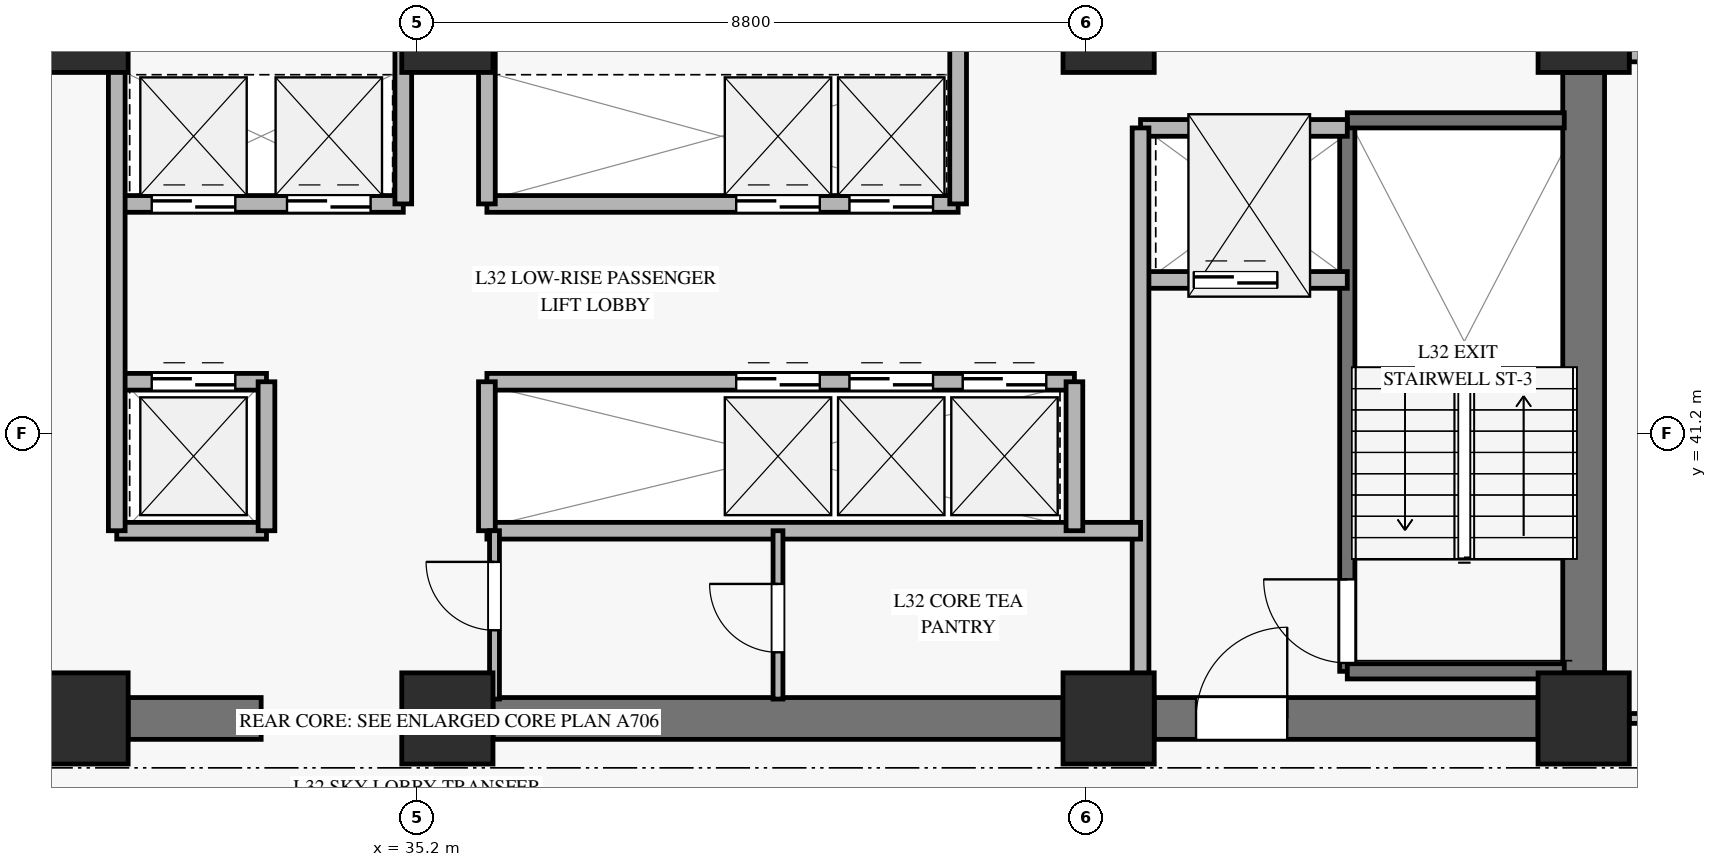
"""IFC4 building model, lengths in metres.
Left out: names, types, materials, properties, quantities, classifications, styles, units other than length and angle.
Written with IfcOpenShell. Run it as: python <this file> out.ifc"""

import sys

from ifc_helpers import new_model, si_unit, direction, frame, frame_2d, origin, origin_2d, place, context, subcontext, project, spatial, rectangle, extrude, source, transform, mapped, element, fill, save


model = new_model("IFC4")
c1 = context("Model", 3, precision=1e-05, world=origin(), true_north=direction((0.0, 1.0)))
c2 = subcontext(c1, "Body", "Model", "MODEL_VIEW")
j1 = project(units=[si_unit("LENGTHUNIT", "METRE"), si_unit("PLANEANGLEUNIT", "RADIAN")], contexts=[c1])
p1 = place(None, origin())
s1 = spatial("IfcSite", under=j1, at=p1, CompositionType="ELEMENT")
p2 = place(p1, origin())
s2 = spatial("IfcBuilding", under=s1, at=p2, CompositionType="ELEMENT")
p3 = place(p2, frame((0.0, 0.0, 130.9)))
s3 = spatial("IfcBuildingStorey", under=s2, at=p3, CompositionType="ELEMENT", Elevation=130.9)
m1 = source(origin(), c2, "Body", "SweptSolid", [
    extrude(rectangle(XDim=1.2, YDim=1.2, at=origin_2d()), origin(), (0.0, 0.0, 1.0), 6.57),
])
for number, where, z_axis, x_axis in (
    (1, (30.8, 37.45, 0.0), (0.0, 0.0, 1.0), (1.0, 0.0, 0.0)),
    (2, (30.8, 46.55, 0.0), (0.0, 0.0, 1.0), (1.0, 0.0, 0.0)),
    (3, (35.6, 37.45, 0.0), (0.0, 0.0, 1.0), (1.0, 0.0, 0.0)),
    (4, (35.6, 46.55, 0.0), (0.0, 0.0, 1.0), (1.0, 0.0, 0.0)),
    (5, (44.3, 37.45, 0.0), (0.0, 0.0, 1.0), (1.0, 0.0, 0.0)),
    (6, (44.3, 46.55, 0.0), (0.0, 0.0, 1.0), (1.0, 0.0, 0.0)),
    (7, (50.55, 37.45, 0.0), (0.0, 0.0, 1.0), (1.0, 0.0, 0.0)),
    (8, (50.55, 46.55, 0.0), (0.0, 0.0, 1.0), (1.0, 0.0, 0.0)),
):
    element("IfcColumn", number, at=place(p3, frame(where, z_axis=z_axis, x_axis=x_axis)), inside=s3, PredefinedType="PILASTER", context=c2, shape_type="MappedRepresentation", body=[
        mapped(m1, transform((0.0, 0.0, 0.0), x_axis=(1.0, 0.0, 0.0), y_axis=(0.0, 1.0, 0.0), z_axis=(0.0, 0.0, 1.0), scale=1.0)),
    ])
p4 = place(p3, frame((31.4, 37.45, 0.0), z_axis=(0.0, 0.0, 1.0), x_axis=(1.0, 0.0, 0.0)))
e9 = element("IfcWall", 9, at=p4, inside=s3, PredefinedType="SHEAR", context=c2, shape_type="SweptSolid", body=[
    extrude(rectangle(XDim=1.75, YDim=0.55, at=frame_2d((0.875, 0.0))), origin(), (0.0, 0.0, 1.0), 6.57),
])
p5 = place(p3, frame((36.2, 37.45, 0.0), z_axis=(0.0, 0.0, 1.0), x_axis=(1.0, 0.0, 0.0)))
e10 = element("IfcWall", 10, at=p5, inside=s3, PredefinedType="SHEAR", context=c2, shape_type="SweptSolid", body=[
    extrude(rectangle(XDim=7.5, YDim=0.55, at=frame_2d((3.75, 0.0))), origin(), (0.0, 0.0, 1.0), 6.57),
])
p6 = place(p3, frame((44.9, 37.45, 0.0), z_axis=(0.0, 0.0, 1.0), x_axis=(1.0, 0.0, 0.0)))
e11 = element("IfcWall", 11, at=p6, inside=s3, PredefinedType="SHEAR", context=c2, shape_type="SweptSolid", body=[
    extrude(rectangle(XDim=5.05, YDim=0.55, at=frame_2d((2.525, 0.0))), origin(), (0.0, 0.0, 1.0), 6.57),
])
p7 = place(p6, frame((0.55, 0.0, 0.0)))
e12 = element("IfcOpeningElement", 12, at=p7, cuts=e11, PredefinedType="OPENING", context=c2, shape_type="SweptSolid", body=[
    extrude(rectangle(XDim=1.2, YDim=2.15, at=frame_2d((0.6, 1.075))), frame((0.0, 0.285, 0.0), z_axis=(0.0, -1.0, 0.0), x_axis=(1.0, 0.0, 0.0)), (0.0, 0.0, 1.0), 0.57),
])
p8 = place(p3, frame((50.55, 38.05, 0.0), z_axis=(0.0, 0.0, 1.0), x_axis=(0.0, 1.0, 0.0)))
e13 = element("IfcWall", 13, at=p8, inside=s3, PredefinedType="SHEAR", context=c2, shape_type="SweptSolid", body=[
    extrude(rectangle(XDim=7.9, YDim=0.55, at=frame_2d((3.95, 0.0))), origin(), (0.0, 0.0, 1.0), 6.57),
])
p9 = place(p3, frame((51.15, 46.25, 0.0), z_axis=(0.0, 0.0, 1.0), x_axis=(1.0, 0.0, 0.0)))
e14 = element("IfcWall", 14, at=p9, inside=s3, PredefinedType="SOLIDWALL", context=c2, shape_type="SweptSolid", body=[
    extrude(rectangle(XDim=10.83, YDim=0.32, at=frame_2d((5.415, 0.0))), origin(), (0.0, 0.0, 1.0), 6.05),
])
p10 = place(p9, frame((4.615, 0.0, 0.45)))
e15 = element("IfcOpeningElement", 15, at=p10, cuts=e14, PredefinedType="OPENING", context=c2, shape_type="SweptSolid", body=[
    extrude(rectangle(XDim=1.6, YDim=2.0, at=frame_2d((0.8, 1.0))), frame((0.0, 0.17, 0.0), z_axis=(0.0, -1.0, 0.0), x_axis=(1.0, 0.0, 0.0)), (0.0, 0.0, 1.0), 0.34),
])
p11 = place(p3, frame((47.44, 38.07, 0.0), z_axis=(0.0, 0.0, 1.0), x_axis=(0.0, 1.0, 0.0)))
e16 = element("IfcWall", 16, at=p11, inside=s3, PredefinedType="SOLIDWALL", context=c2, shape_type="SweptSolid", body=[
    extrude(rectangle(XDim=7.25, YDim=0.2, at=frame_2d((3.625, 0.0))), origin(), (0.0, 0.0, 1.0), 6.8),
])
p12 = place(p11, frame((0.11, 0.0, 0.0)))
e17 = element("IfcOpeningElement", 17, at=p12, cuts=e16, PredefinedType="OPENING", context=c2, shape_type="SweptSolid", body=[
    extrude(rectangle(XDim=1.1, YDim=2.15, at=frame_2d((0.55, 1.075))), frame((0.0, 0.11, 0.0), z_axis=(0.0, -1.0, 0.0), x_axis=(1.0, 0.0, 0.0)), (0.0, 0.0, 1.0), 0.22),
])
for number, where, z_axis, x_axis in (
    (18, (47.44, 45.32, 0.0), (0.0, 0.0, 1.0), (1.0, 0.0, 0.0)),
    (19, (47.44, 38.07, 0.0), (0.0, 0.0, 1.0), (1.0, 0.0, 0.0)),
):
    element("IfcWall", number, at=place(p3, frame(where, z_axis=z_axis, x_axis=x_axis)), inside=s3, PredefinedType="SOLIDWALL", context=c2, shape_type="SweptSolid", body=[
        extrude(rectangle(XDim=2.855, YDim=0.2, at=frame_2d((1.427, 0.0))), origin(), (0.0, 0.0, 1.0), 6.8),
    ])
p13 = place(p3, frame((44.72, 43.22, 0.0), z_axis=(0.0, 0.0, 1.0), x_axis=(1.0, 0.0, 0.0)))
e20 = element("IfcWall", 20, at=p13, inside=s3, PredefinedType="SOLIDWALL", context=c2, shape_type="SweptSolid", body=[
    extrude(rectangle(XDim=2.72, YDim=0.22, at=frame_2d((1.36, 0.0))), origin(), (0.0, 0.0, 1.0), 6.57),
])
p14 = place(p13, frame((0.7, 0.0, 0.0)))
e21 = element("IfcOpeningElement", 21, at=p14, cuts=e20, PredefinedType="OPENING", context=c2, shape_type="SweptSolid", body=[
    extrude(rectangle(XDim=1.1, YDim=2.2, at=frame_2d((0.55, 1.1))), frame((0.0, 0.12, 0.0), z_axis=(0.0, -1.0, 0.0), x_axis=(1.0, 0.0, 0.0)), (0.0, 0.0, 1.0), 0.24),
])
p15 = place(p3, frame((44.72, 45.22, 0.0), z_axis=(0.0, 0.0, 1.0), x_axis=(1.0, 0.0, 0.0)))
e22 = element("IfcWall", 22, at=p15, inside=s3, PredefinedType="SOLIDWALL", context=c2, shape_type="SweptSolid", body=[
    extrude(rectangle(XDim=2.72, YDim=0.22, at=frame_2d((1.36, 0.0))), origin(), (0.0, 0.0, 1.0), 6.57),
])
p16 = place(p3, frame((44.72, 37.705, 0.0), z_axis=(0.0, 0.0, 1.0), x_axis=(0.0, 1.0, 0.0)))
e23 = element("IfcWall", 23, at=p16, inside=s3, PredefinedType="SOLIDWALL", context=c2, shape_type="SweptSolid", body=[
    extrude(rectangle(XDim=7.515, YDim=0.22, at=frame_2d((3.757, 0.0))), origin(), (0.0, 0.0, 1.0), 6.57),
])
p17 = place(p3, frame((31.25, 44.22, 0.0), z_axis=(0.0, 0.0, 1.0), x_axis=(1.0, 0.0, 0.0)))
e24 = element("IfcWall", 24, at=p17, inside=s3, PredefinedType="SOLIDWALL", context=c2, shape_type="SweptSolid", body=[
    extrude(rectangle(XDim=3.77, YDim=0.22, at=frame_2d((1.885, 0.0))), origin(), (0.0, 0.0, 1.0), 6.57),
])
p18 = place(p17, frame((0.46, 0.0, 0.0)))
e25 = element("IfcOpeningElement", 25, at=p18, cuts=e24, PredefinedType="OPENING", context=c2, shape_type="SweptSolid", body=[
    extrude(rectangle(XDim=1.1, YDim=2.2, at=frame_2d((0.55, 1.1))), frame((0.0, 0.12, 0.0), z_axis=(0.0, -1.0, 0.0), x_axis=(1.0, 0.0, 0.0)), (0.0, 0.0, 1.0), 0.24),
])
p19 = place(p17, frame((2.24, 0.0, 0.0)))
e26 = element("IfcOpeningElement", 26, at=p19, cuts=e24, PredefinedType="OPENING", context=c2, shape_type="SweptSolid", body=[
    extrude(rectangle(XDim=1.1, YDim=2.2, at=frame_2d((0.55, 1.1))), frame((0.0, 0.12, 0.0), z_axis=(0.0, -1.0, 0.0), x_axis=(1.0, 0.0, 0.0)), (0.0, 0.0, 1.0), 0.24),
])
p20 = place(p3, frame((36.12, 44.22, 0.0), z_axis=(0.0, 0.0, 1.0), x_axis=(1.0, 0.0, 0.0)))
e27 = element("IfcWall", 27, at=p20, inside=s3, PredefinedType="SOLIDWALL", context=c2, shape_type="SweptSolid", body=[
    extrude(rectangle(XDim=6.2, YDim=0.22, at=frame_2d((3.1, 0.0))), origin(), (0.0, 0.0, 1.0), 6.57),
])
p21 = place(p20, frame((3.28, 0.0, 0.0)))
e28 = element("IfcOpeningElement", 28, at=p21, cuts=e27, PredefinedType="OPENING", context=c2, shape_type="SweptSolid", body=[
    extrude(rectangle(XDim=1.1, YDim=2.2, at=frame_2d((0.55, 1.1))), frame((0.0, 0.12, 0.0), z_axis=(0.0, -1.0, 0.0), x_axis=(1.0, 0.0, 0.0)), (0.0, 0.0, 1.0), 0.24),
])
p22 = place(p20, frame((4.77, 0.0, 0.0)))
e29 = element("IfcOpeningElement", 29, at=p22, cuts=e27, PredefinedType="OPENING", context=c2, shape_type="SweptSolid", body=[
    extrude(rectangle(XDim=1.1, YDim=2.2, at=frame_2d((0.55, 1.1))), frame((0.0, 0.12, 0.0), z_axis=(0.0, -1.0, 0.0), x_axis=(1.0, 0.0, 0.0)), (0.0, 0.0, 1.0), 0.24),
])
for number, where, z_axis, x_axis in (
    (30, (35.02, 44.22, 0.0), (0.0, 0.0, 1.0), (0.0, 1.0, 0.0)),
    (31, (36.12, 44.22, 0.0), (0.0, 0.0, 1.0), (0.0, 1.0, 0.0)),
    (32, (42.32, 44.22, 0.0), (0.0, 0.0, 1.0), (0.0, 1.0, 0.0)),
):
    element("IfcWall", number, at=place(p3, frame(where, z_axis=z_axis, x_axis=x_axis)), inside=s3, PredefinedType="SOLIDWALL", context=c2, shape_type="SweptSolid", body=[
        extrude(rectangle(XDim=2.075, YDim=0.22, at=frame_2d((1.038, 0.0))), origin(), (0.0, 0.0, 1.0), 6.57),
    ])
p23 = place(p3, frame((31.25, 41.88, 0.0), z_axis=(0.0, 0.0, 1.0), x_axis=(1.0, 0.0, 0.0)))
e33 = element("IfcWall", 33, at=p23, inside=s3, PredefinedType="SOLIDWALL", context=c2, shape_type="SweptSolid", body=[
    extrude(rectangle(XDim=1.97, YDim=0.22, at=frame_2d((0.985, 0.0))), origin(), (0.0, 0.0, 1.0), 6.57),
])
p24 = place(p23, frame((0.46, 0.0, 0.0)))
e34 = element("IfcOpeningElement", 34, at=p24, cuts=e33, PredefinedType="OPENING", context=c2, shape_type="SweptSolid", body=[
    extrude(rectangle(XDim=1.1, YDim=2.2, at=frame_2d((0.55, 1.1))), frame((0.0, 0.12, 0.0), z_axis=(0.0, -1.0, 0.0), x_axis=(1.0, 0.0, 0.0)), (0.0, 0.0, 1.0), 0.24),
])
p25 = place(p3, frame((36.12, 41.88, 0.0), z_axis=(0.0, 0.0, 1.0), x_axis=(1.0, 0.0, 0.0)))
e35 = element("IfcWall", 35, at=p25, inside=s3, PredefinedType="SOLIDWALL", context=c2, shape_type="SweptSolid", body=[
    extrude(rectangle(XDim=7.73, YDim=0.22, at=frame_2d((3.865, 0.0))), origin(), (0.0, 0.0, 1.0), 6.57),
])
p26 = place(p25, frame((6.26, 0.0, 0.0)))
e36 = element("IfcOpeningElement", 36, at=p26, cuts=e35, PredefinedType="OPENING", context=c2, shape_type="SweptSolid", body=[
    extrude(rectangle(XDim=1.1, YDim=2.2, at=frame_2d((0.55, 1.1))), frame((0.0, 0.12, 0.0), z_axis=(0.0, -1.0, 0.0), x_axis=(1.0, 0.0, 0.0)), (0.0, 0.0, 1.0), 0.24),
])
p27 = place(p25, frame((3.28, 0.0, 0.0)))
e37 = element("IfcOpeningElement", 37, at=p27, cuts=e35, PredefinedType="OPENING", context=c2, shape_type="SweptSolid", body=[
    extrude(rectangle(XDim=1.1, YDim=2.2, at=frame_2d((0.55, 1.1))), frame((0.0, 0.12, 0.0), z_axis=(0.0, -1.0, 0.0), x_axis=(1.0, 0.0, 0.0)), (0.0, 0.0, 1.0), 0.24),
])
p28 = place(p25, frame((4.77, 0.0, 0.0)))
e38 = element("IfcOpeningElement", 38, at=p28, cuts=e35, PredefinedType="OPENING", context=c2, shape_type="SweptSolid", body=[
    extrude(rectangle(XDim=1.1, YDim=2.2, at=frame_2d((0.55, 1.1))), frame((0.0, 0.12, 0.0), z_axis=(0.0, -1.0, 0.0), x_axis=(1.0, 0.0, 0.0)), (0.0, 0.0, 1.0), 0.24),
])
p29 = place(p3, frame((31.25, 39.92, 0.0), z_axis=(0.0, 0.0, 1.0), x_axis=(1.0, 0.0, 0.0)))
e39 = element("IfcWall", 39, at=p29, inside=s3, PredefinedType="SOLIDWALL", context=c2, shape_type="SweptSolid", body=[
    extrude(rectangle(XDim=1.97, YDim=0.22, at=frame_2d((0.985, 0.0))), origin(), (0.0, 0.0, 1.0), 6.57),
])
p30 = place(p3, frame((33.22, 39.92, 0.0), z_axis=(0.0, 0.0, 1.0), x_axis=(0.0, 1.0, 0.0)))
e40 = element("IfcWall", 40, at=p30, inside=s3, PredefinedType="SOLIDWALL", context=c2, shape_type="SweptSolid", body=[
    extrude(rectangle(XDim=1.96, YDim=0.22, at=frame_2d((0.98, 0.0))), origin(), (0.0, 0.0, 1.0), 6.57),
])
p31 = place(p3, frame((36.12, 39.92, 0.0), z_axis=(0.0, 0.0, 1.0), x_axis=(1.0, 0.0, 0.0)))
e41 = element("IfcWall", 41, at=p31, inside=s3, PredefinedType="SOLIDWALL", context=c2, shape_type="SweptSolid", body=[
    extrude(rectangle(XDim=8.6, YDim=0.22, at=frame_2d((4.3, 0.0))), origin(), (0.0, 0.0, 1.0), 5.855),
])
p32 = place(p3, frame((36.12, 39.92, 0.0), z_axis=(0.0, 0.0, 1.0), x_axis=(0.0, 1.0, 0.0)))
e42 = element("IfcWall", 42, at=p32, inside=s3, PredefinedType="SOLIDWALL", context=c2, shape_type="SweptSolid", body=[
    extrude(rectangle(XDim=1.96, YDim=0.22, at=frame_2d((0.98, 0.0))), origin(), (0.0, 0.0, 1.0), 6.57),
])
p33 = place(p3, frame((31.25, 39.92, 0.0), z_axis=(0.0, 0.0, 1.0), x_axis=(0.0, 1.0, 0.0)))
e43 = element("IfcWall", 43, at=p33, inside=s3, PredefinedType="SOLIDWALL", context=c2, shape_type="SweptSolid", body=[
    extrude(rectangle(XDim=6.375, YDim=0.22, at=frame_2d((3.188, 0.0))), origin(), (0.0, 0.0, 1.0), 6.57),
])
p34 = place(p3, frame((43.85, 39.92, 0.0), z_axis=(0.0, 0.0, 1.0), x_axis=(0.0, 1.0, 0.0)))
e44 = element("IfcWall", 44, at=p34, inside=s3, PredefinedType="SOLIDWALL", context=c2, shape_type="SweptSolid", body=[
    extrude(rectangle(XDim=1.96, YDim=0.22, at=frame_2d((0.98, 0.0))), origin(), (0.0, 0.0, 1.0), 6.57),
])
p35 = place(p3, frame((36.22, 37.705, 0.0), z_axis=(0.0, 0.0, 1.0), x_axis=(0.0, 1.0, 0.0)))
e45 = element("IfcWall", 45, at=p35, inside=s3, PredefinedType="PARTITIONING", context=c2, shape_type="SweptSolid", body=[
    extrude(rectangle(XDim=2.215, YDim=0.13, at=frame_2d((1.107, 0.0))), origin(), (0.0, 0.0, 1.0), 6.57),
])
p36 = place(p35, frame((0.905, 0.0, 0.0)))
e46 = element("IfcOpeningElement", 46, at=p36, cuts=e45, PredefinedType="OPENING", context=c2, shape_type="SweptSolid", body=[
    extrude(rectangle(XDim=0.9, YDim=2.1, at=frame_2d((0.45, 1.05))), frame((0.0, 0.075, 0.0), z_axis=(0.0, -1.0, 0.0), x_axis=(1.0, 0.0, 0.0)), (0.0, 0.0, 1.0), 0.15),
])
p37 = place(p3, frame((39.95, 37.705, 0.0), z_axis=(0.0, 0.0, 1.0), x_axis=(0.0, 1.0, 0.0)))
e47 = element("IfcWall", 47, at=p37, inside=s3, PredefinedType="PARTITIONING", context=c2, shape_type="SweptSolid", body=[
    extrude(rectangle(XDim=2.215, YDim=0.13, at=frame_2d((1.107, 0.0))), origin(), (0.0, 0.0, 1.0), 6.57),
])
p38 = place(p37, frame((0.615, 0.0, 0.0)))
e48 = element("IfcOpeningElement", 48, at=p38, cuts=e47, PredefinedType="OPENING", context=c2, shape_type="SweptSolid", body=[
    extrude(rectangle(XDim=0.9, YDim=2.1, at=frame_2d((0.45, 1.05))), frame((0.0, 0.075, 0.0), z_axis=(0.0, -1.0, 0.0), x_axis=(1.0, 0.0, 0.0)), (0.0, 0.0, 1.0), 0.15),
])
p39 = place(p3, frame((51.15, 37.45, 0.0), z_axis=(0.0, 0.0, 1.0), x_axis=(1.0, 0.0, 0.0)))
e49 = element("IfcWall", 49, at=p39, inside=s3, PredefinedType="PARTITIONING", context=c2, shape_type="SweptSolid", body=[
    extrude(rectangle(XDim=14.271, YDim=0.13, at=frame_2d((7.135, 0.0))), origin(), (0.0, 0.0, 1.0), 6.055),
])
p40 = place(p39, frame((0.5, 0.0, 0.0)))
e50 = element("IfcOpeningElement", 50, at=p40, cuts=e49, PredefinedType="OPENING", context=c2, shape_type="SweptSolid", body=[
    extrude(rectangle(XDim=0.9, YDim=2.1, at=frame_2d((0.45, 1.05))), frame((0.0, 0.075, 0.0), z_axis=(0.0, -1.0, 0.0), x_axis=(1.0, 0.0, 0.0)), (0.0, 0.0, 1.0), 0.15),
])
p41 = place(p39, frame((10.265, 0.0, 0.0)))
e51 = element("IfcOpeningElement", 51, at=p41, cuts=e49, PredefinedType="OPENING", context=c2, shape_type="SweptSolid", body=[
    extrude(rectangle(XDim=0.95, YDim=2.1, at=frame_2d((0.475, 1.05))), frame((0.0, 0.075, 0.0), z_axis=(0.0, -1.0, 0.0), x_axis=(1.0, 0.0, 0.0)), (0.0, 0.0, 1.0), 0.15),
])
m2 = source(origin(), c2, "Body", "SweptSolid", [
    extrude(rectangle(XDim=1.1, YDim=2.15, at=frame_2d((0.55, 1.075))), frame((0.0, 0.025, 0.0), z_axis=(0.0, -1.0, 0.0), x_axis=(1.0, 0.0, 0.0)), (0.0, 0.0, 1.0), 0.05),
])
p42 = place(p12, origin())
e52 = element("IfcDoor", 52, at=p42, inside=s3, OperationType="SINGLE_SWING_RIGHT", PredefinedType="DOOR", context=c2, shape_type="MappedRepresentation", body=[
    mapped(m2, transform((0.0, 0.0, 0.0), x_axis=(1.0, 0.0, 0.0), y_axis=(0.0, 1.0, 0.0), z_axis=(0.0, 0.0, 1.0), scale=1.0)),
])
fill(e17, e52)
m3 = source(origin(), c2, "Body", "SweptSolid", [
    extrude(rectangle(XDim=1.1, YDim=2.2, at=frame_2d((0.55, 1.1))), frame((0.0, 0.025, 0.0), z_axis=(0.0, -1.0, 0.0), x_axis=(1.0, 0.0, 0.0)), (0.0, 0.0, 1.0), 0.05),
])
p43 = place(p14, origin())
e53 = element("IfcDoor", 53, at=p43, inside=s3, OperationType="SLIDING_TO_LEFT", PredefinedType="DOOR", context=c2, shape_type="MappedRepresentation", body=[
    mapped(m3, transform((0.0, 0.0, 0.0), x_axis=(1.0, 0.0, 0.0), y_axis=(0.0, 1.0, 0.0), z_axis=(0.0, 0.0, 1.0), scale=1.0)),
])
fill(e21, e53)
m4 = source(origin(), c2, "Body", "SweptSolid", [
    extrude(rectangle(XDim=1.2, YDim=2.15, at=frame_2d((0.6, 1.075))), frame((0.0, 0.025, 0.0), z_axis=(0.0, -1.0, 0.0), x_axis=(1.0, 0.0, 0.0)), (0.0, 0.0, 1.0), 0.05),
])
p44 = place(p7, origin())
e54 = element("IfcDoor", 54, at=p44, inside=s3, OperationType="SINGLE_SWING_RIGHT", PredefinedType="DOOR", context=c2, shape_type="MappedRepresentation", body=[
    mapped(m4, transform((0.0, 0.0, 0.0), x_axis=(1.0, 0.0, 0.0), y_axis=(0.0, 1.0, 0.0), z_axis=(0.0, 0.0, 1.0), scale=1.0)),
])
fill(e12, e54)
p45 = place(p18, origin())
e55 = element("IfcDoor", 55, at=p45, inside=s3, OperationType="SLIDING_TO_LEFT", PredefinedType="DOOR", context=c2, shape_type="MappedRepresentation", body=[
    mapped(m3, transform((0.0, 0.0, 0.0), x_axis=(1.0, 0.0, 0.0), y_axis=(0.0, 1.0, 0.0), z_axis=(0.0, 0.0, 1.0), scale=1.0)),
])
fill(e25, e55)
p46 = place(p19, origin())
e56 = element("IfcDoor", 56, at=p46, inside=s3, OperationType="SLIDING_TO_LEFT", PredefinedType="DOOR", context=c2, shape_type="MappedRepresentation", body=[
    mapped(m3, transform((0.0, 0.0, 0.0), x_axis=(1.0, 0.0, 0.0), y_axis=(0.0, 1.0, 0.0), z_axis=(0.0, 0.0, 1.0), scale=1.0)),
])
fill(e26, e56)
p47 = place(p24, origin())
e57 = element("IfcDoor", 57, at=p47, inside=s3, OperationType="SLIDING_TO_LEFT", PredefinedType="DOOR", context=c2, shape_type="MappedRepresentation", body=[
    mapped(m3, transform((0.0, 0.0, 0.0), x_axis=(1.0, 0.0, 0.0), y_axis=(0.0, 1.0, 0.0), z_axis=(0.0, 0.0, 1.0), scale=1.0)),
])
fill(e34, e57)
p48 = place(p26, origin())
e58 = element("IfcDoor", 58, at=p48, inside=s3, OperationType="SLIDING_TO_LEFT", PredefinedType="DOOR", context=c2, shape_type="MappedRepresentation", body=[
    mapped(m3, transform((0.0, 0.0, 0.0), x_axis=(1.0, 0.0, 0.0), y_axis=(0.0, 1.0, 0.0), z_axis=(0.0, 0.0, 1.0), scale=1.0)),
])
fill(e36, e58)
p49 = place(p21, origin())
e59 = element("IfcDoor", 59, at=p49, inside=s3, OperationType="SLIDING_TO_LEFT", PredefinedType="DOOR", context=c2, shape_type="MappedRepresentation", body=[
    mapped(m3, transform((0.0, 0.0, 0.0), x_axis=(1.0, 0.0, 0.0), y_axis=(0.0, 1.0, 0.0), z_axis=(0.0, 0.0, 1.0), scale=1.0)),
])
fill(e28, e59)
p50 = place(p22, origin())
e60 = element("IfcDoor", 60, at=p50, inside=s3, OperationType="SLIDING_TO_LEFT", PredefinedType="DOOR", context=c2, shape_type="MappedRepresentation", body=[
    mapped(m3, transform((0.0, 0.0, 0.0), x_axis=(1.0, 0.0, 0.0), y_axis=(0.0, 1.0, 0.0), z_axis=(0.0, 0.0, 1.0), scale=1.0)),
])
fill(e29, e60)
p51 = place(p27, origin())
e61 = element("IfcDoor", 61, at=p51, inside=s3, OperationType="SLIDING_TO_LEFT", PredefinedType="DOOR", context=c2, shape_type="MappedRepresentation", body=[
    mapped(m3, transform((0.0, 0.0, 0.0), x_axis=(1.0, 0.0, 0.0), y_axis=(0.0, 1.0, 0.0), z_axis=(0.0, 0.0, 1.0), scale=1.0)),
])
fill(e37, e61)
p52 = place(p28, origin())
e62 = element("IfcDoor", 62, at=p52, inside=s3, OperationType="SLIDING_TO_LEFT", PredefinedType="DOOR", context=c2, shape_type="MappedRepresentation", body=[
    mapped(m3, transform((0.0, 0.0, 0.0), x_axis=(1.0, 0.0, 0.0), y_axis=(0.0, 1.0, 0.0), z_axis=(0.0, 0.0, 1.0), scale=1.0)),
])
fill(e38, e62)
m5 = source(origin(), c2, "Body", "SweptSolid", [
    extrude(rectangle(XDim=0.9, YDim=2.1, at=frame_2d((0.45, 1.05))), frame((0.0, 0.025, 0.0), z_axis=(0.0, -1.0, 0.0), x_axis=(1.0, 0.0, 0.0)), (0.0, 0.0, 1.0), 0.05),
])
p53 = place(p36, origin())
e63 = element("IfcDoor", 63, at=p53, inside=s3, OperationType="SINGLE_SWING_RIGHT", PredefinedType="DOOR", context=c2, shape_type="MappedRepresentation", body=[
    mapped(m5, transform((0.0, 0.0, 0.0), x_axis=(1.0, 0.0, 0.0), y_axis=(0.0, 1.0, 0.0), z_axis=(0.0, 0.0, 1.0), scale=1.0)),
])
fill(e46, e63)
p54 = place(p38, origin())
e64 = element("IfcDoor", 64, at=p54, inside=s3, OperationType="SINGLE_SWING_RIGHT", PredefinedType="DOOR", context=c2, shape_type="MappedRepresentation", body=[
    mapped(m5, transform((0.0, 0.0, 0.0), x_axis=(1.0, 0.0, 0.0), y_axis=(0.0, 1.0, 0.0), z_axis=(0.0, 0.0, 1.0), scale=1.0)),
])
fill(e48, e64)
save(model, sys.argv[1])
